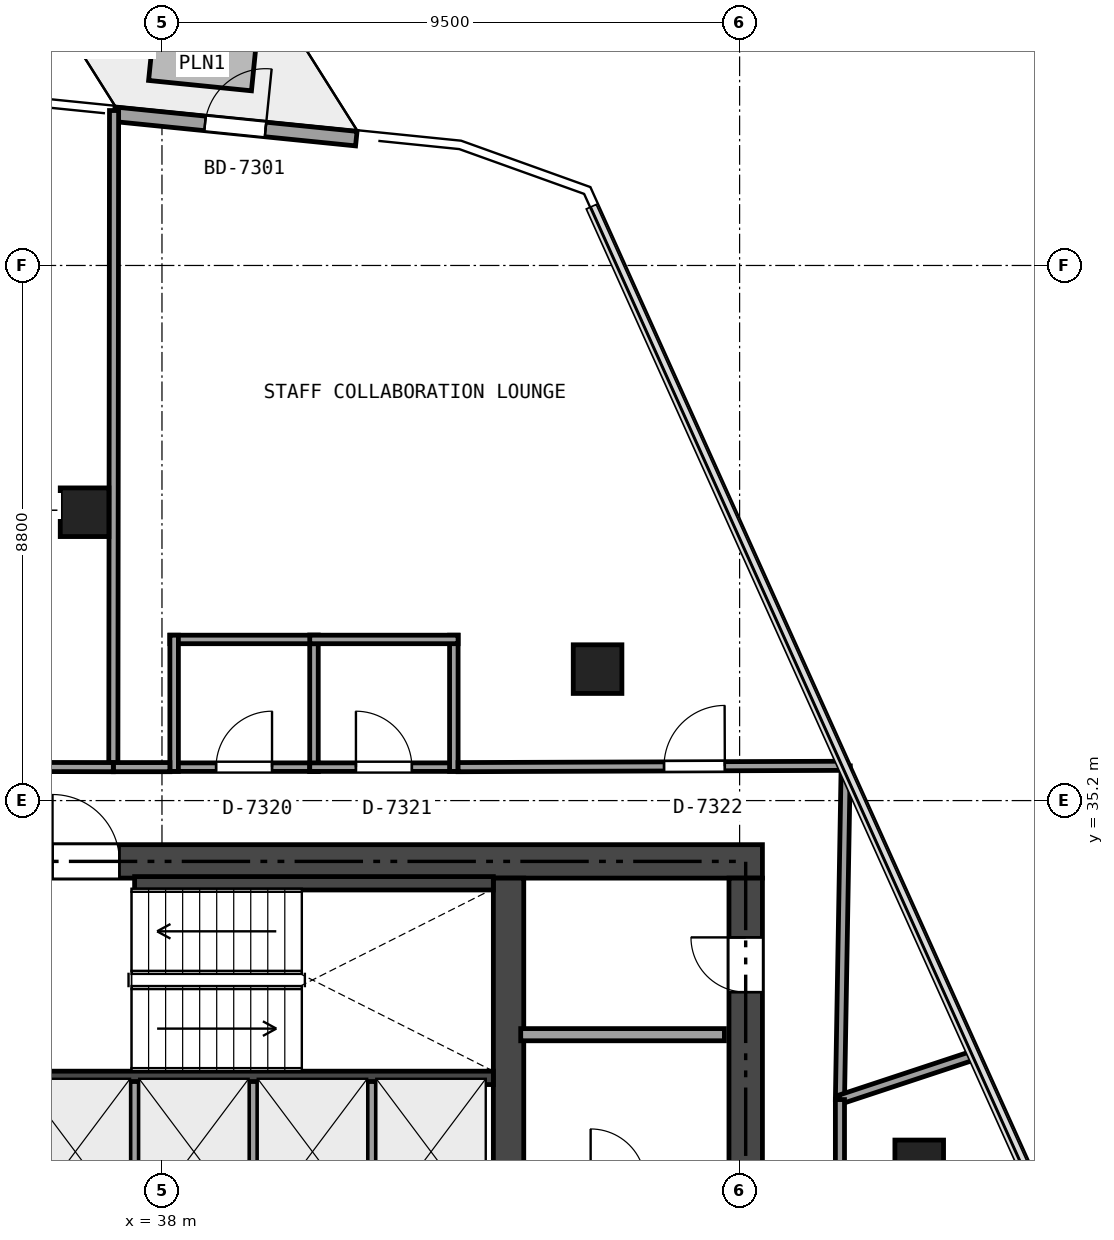
"""IFC4 building model, lengths in metres.
Left out: names, types, materials, properties, quantities, classifications, styles, units other than length and angle.
Written with IfcOpenShell. Run it as: python <this file> out.ifc"""

import sys

from ifc_helpers import new_model, si_unit, direction, frame, frame_2d, origin, origin_2d, place, context, subcontext, project, spatial, rectangle, extrude, element, fill, save


model = new_model("IFC4")
c1 = context("Model", 3, precision=1e-05, world=origin(), true_north=direction((0.0, 1.0)))
c2 = subcontext(c1, "Body", "Model", "MODEL_VIEW")
j1 = project(units=[si_unit("LENGTHUNIT", "METRE"), si_unit("PLANEANGLEUNIT", "RADIAN")], contexts=[c1])
p1 = place(None, origin())
s1 = spatial("IfcSite", under=j1, at=p1, CompositionType="ELEMENT")
p2 = place(p1, origin())
s2 = spatial("IfcBuilding", under=s1, at=p2, CompositionType="ELEMENT")
p3 = place(p2, frame((0.0, 0.0, 271.5)))
s3 = spatial("IfcBuildingStorey", under=s2, at=p3, CompositionType="ELEMENT", Elevation=271.5)
p4 = place(p3, frame((26.525, 34.2, 0.0), z_axis=(0.0, 0.0, 1.0), x_axis=(1.0, 0.0, 0.0)))
e1 = element("IfcWall", 1, at=p4, inside=s3, PredefinedType="SHEAR", context=c2, shape_type="SweptSolid", body=[
    extrude(rectangle(XDim=21.35, YDim=0.55, at=frame_2d((10.675, 0.0))), origin(), (0.0, 0.0, 1.0), 3.32),
])
p5 = place(p4, frame((9.675, 0.0, 0.0)))
e2 = element("IfcOpeningElement", 2, at=p5, cuts=e1, PredefinedType="OPENING", context=c2, shape_type="SweptSolid", body=[
    extrude(rectangle(XDim=1.1, YDim=2.15, at=frame_2d((0.55, 1.075))), frame((0.0, 0.285, 0.0), z_axis=(0.0, -1.0, 0.0), x_axis=(1.0, 0.0, 0.0)), (0.0, 0.0, 1.0), 0.57),
])
p6 = place(p4, frame((1.925, 0.0, 0.0)))
e3 = element("IfcOpeningElement", 3, at=p6, cuts=e1, PredefinedType="OPENING", context=c2, shape_type="SweptSolid", body=[
    extrude(rectangle(XDim=0.9, YDim=2.1, at=frame_2d((0.45, 1.05))), frame((0.0, 0.285, 0.0), z_axis=(0.0, -1.0, 0.0), x_axis=(1.0, 0.0, 0.0)), (0.0, 0.0, 1.0), 0.57),
])
p7 = place(p4, frame((6.225, 0.0, 0.0)))
e4 = element("IfcOpeningElement", 4, at=p7, cuts=e1, PredefinedType="OPENING", context=c2, shape_type="SweptSolid", body=[
    extrude(rectangle(XDim=0.9, YDim=2.1, at=frame_2d((0.45, 1.05))), frame((0.0, 0.285, 0.0), z_axis=(0.0, -1.0, 0.0), x_axis=(1.0, 0.0, 0.0)), (0.0, 0.0, 1.0), 0.57),
])
p8 = place(p3, frame((47.6, 18.875, 0.0), z_axis=(0.0, 0.0, 1.0), x_axis=(0.0, 1.0, 0.0)))
e5 = element("IfcWall", 5, at=p8, inside=s3, PredefinedType="SHEAR", context=c2, shape_type="SweptSolid", body=[
    extrude(rectangle(XDim=15.05, YDim=0.55, at=frame_2d((7.525, 0.0))), origin(), (0.0, 0.0, 1.0), 3.32),
])
p9 = place(p8, frame((6.625, 0.0, 0.0)))
e6 = element("IfcOpeningElement", 6, at=p9, cuts=e5, PredefinedType="OPENING", context=c2, shape_type="SweptSolid", body=[
    extrude(rectangle(XDim=1.1, YDim=2.15, at=frame_2d((0.55, 1.075))), frame((0.0, 0.285, 0.0), z_axis=(0.0, -1.0, 0.0), x_axis=(1.0, 0.0, 0.0)), (0.0, 0.0, 1.0), 0.57),
])
p10 = place(p8, frame((8.525, 0.0, 0.0)))
e7 = element("IfcOpeningElement", 7, at=p10, cuts=e5, PredefinedType="OPENING", context=c2, shape_type="SweptSolid", body=[
    extrude(rectangle(XDim=0.9, YDim=2.1, at=frame_2d((0.45, 1.05))), frame((0.0, 0.285, 0.0), z_axis=(0.0, -1.0, 0.0), x_axis=(1.0, 0.0, 0.0)), (0.0, 0.0, 1.0), 0.57),
])
p11 = place(p8, frame((13.175, 0.0, 0.0)))
e8 = element("IfcOpeningElement", 8, at=p11, cuts=e5, PredefinedType="OPENING", context=c2, shape_type="SweptSolid", body=[
    extrude(rectangle(XDim=0.9, YDim=2.1, at=frame_2d((0.45, 1.05))), frame((0.0, 0.285, 0.0), z_axis=(0.0, -1.0, 0.0), x_axis=(1.0, 0.0, 0.0)), (0.0, 0.0, 1.0), 0.57),
])
p12 = place(p3, frame((43.7, 18.875, 0.0), z_axis=(0.0, 0.0, 1.0), x_axis=(0.0, 1.0, 0.0)))
e9 = element("IfcWall", 9, at=p12, inside=s3, PredefinedType="SHEAR", context=c2, shape_type="SweptSolid", body=[
    extrude(rectangle(XDim=15.05, YDim=0.5, at=frame_2d((7.525, 0.0))), origin(), (0.0, 0.0, 1.0), 3.32),
])
p13 = place(p12, frame((8.125, 0.0, 0.0)))
e10 = element("IfcOpeningElement", 10, at=p13, cuts=e9, PredefinedType="OPENING", context=c2, shape_type="SweptSolid", body=[
    extrude(rectangle(XDim=0.9, YDim=2.1, at=frame_2d((0.45, 1.05))), frame((0.0, 0.26, 0.0), z_axis=(0.0, -1.0, 0.0), x_axis=(1.0, 0.0, 0.0)), (0.0, 0.0, 1.0), 0.52),
])
p14 = place(p3, frame((35.84, 30.64, 0.0), z_axis=(0.0, 0.0, 1.0), x_axis=(1.0, 0.0, 0.0)))
e11 = element("IfcWall", 11, at=p14, inside=s3, PredefinedType="SHEAR", context=c2, shape_type="SweptSolid", body=[
    extrude(rectangle(XDim=7.61, YDim=0.22, at=frame_2d((3.805, 0.0))), origin(), (0.0, 0.0, 1.0), 3.32),
])
p15 = place(p3, frame((37.55, 33.84, 0.0), z_axis=(0.0, 0.0, 1.0), x_axis=(1.0, 0.0, 0.0)))
e12 = element("IfcWall", 12, at=p15, inside=s3, PredefinedType="SHEAR", context=c2, shape_type="SweptSolid", body=[
    extrude(rectangle(XDim=5.9, YDim=0.22, at=frame_2d((2.95, 0.0))), origin(), (0.0, 0.0, 1.0), 3.32),
])
for number, where, z_axis, x_axis in (
    (13, (50.454, 29.217, 0.0), (0.0, 0.0, 1.0), (1.0, 0.0, 0.0)),
    (14, (45.164, 37.362, 0.0), (0.0, 0.0, 1.0), (1.0, 0.0, 0.0)),
    (15, (36.727, 39.942, 0.0), (0.0, 0.0, 1.0), (1.0, 0.0, 0.0)),
):
    element("IfcColumn", number, at=place(p3, frame(where, z_axis=z_axis, x_axis=x_axis)), inside=s3, PredefinedType="COLUMN", context=c2, shape_type="SweptSolid", body=[
        extrude(rectangle(XDim=0.8, YDim=0.8, at=origin_2d()), origin(), (0.0, 0.0, 1.0), 3.32),
    ])
p16 = place(p3, frame((37.216, 46.487, 0.0), z_axis=(0.0, 0.0, 1.0), x_axis=(0.994959540857, -0.100277176152, 0.0)))
e16 = element("IfcWall", 16, at=p16, inside=s3, PredefinedType="SOLIDWALL", context=c2, shape_type="SweptSolid", body=[
    extrude(rectangle(XDim=4.0, YDim=0.24, at=frame_2d((2.0, 0.0))), origin(), (0.0, 0.0, 1.0), 3.32),
])
p17 = place(p16, frame((1.5, 0.0, 0.0)))
e17 = element("IfcOpeningElement", 17, at=p17, cuts=e16, PredefinedType="OPENING", context=c2, shape_type="SweptSolid", body=[
    extrude(rectangle(XDim=1.0, YDim=2.15, at=frame_2d((0.5, 1.075))), frame((0.0, 0.13, 0.0), z_axis=(0.0, -1.0, 0.0), x_axis=(1.0, 0.0, 0.0)), (0.0, 0.0, 1.0), 0.26),
])
p18 = place(p3, frame((43.9, 31.35, 0.0), z_axis=(0.0, 0.0, 1.0), x_axis=(1.0, 0.0, 0.0)))
e18 = element("IfcWall", 18, at=p18, inside=s3, PredefinedType="SOLIDWALL", context=c2, shape_type="SweptSolid", body=[
    extrude(rectangle(XDim=3.35, YDim=0.2, at=frame_2d((1.675, 0.0))), origin(), (0.0, 0.0, 1.0), 2.993),
])
for number, where, z_axis, x_axis in (
    (19, (37.55, 28.15, 0.0), (0.0, 0.0, 1.0), (0.0, 1.0, 0.0)),
    (20, (39.5, 28.15, 0.0), (0.0, 0.0, 1.0), (0.0, 1.0, 0.0)),
    (21, (41.45, 28.15, 0.0), (0.0, 0.0, 1.0), (0.0, 1.0, 0.0)),
):
    element("IfcWall", number, at=place(p3, frame(where, z_axis=z_axis, x_axis=x_axis)), inside=s3, PredefinedType="PARTITIONING", context=c2, shape_type="SweptSolid", body=[
        extrude(rectangle(XDim=2.43, YDim=0.15, at=frame_2d((1.215, 0.0))), origin(), (0.0, 0.0, 1.0), 3.32),
    ])
p19 = place(p3, frame((38.13, 35.75, 0.0), z_axis=(0.0, 0.0, 1.0), x_axis=(1.0, 0.0, 0.0)))
e22 = element("IfcWall", 22, at=p19, inside=s3, PredefinedType="PARTITIONING", context=c2, shape_type="SweptSolid", body=[
    extrude(rectangle(XDim=2.44, YDim=0.14, at=frame_2d((1.22, 0.0))), origin(), (0.0, 0.0, 1.0), 2.841),
])
p20 = place(p19, frame((0.76, 0.0, 0.0)))
e23 = element("IfcOpeningElement", 23, at=p20, cuts=e22, PredefinedType="OPENING", context=c2, shape_type="SweptSolid", body=[
    extrude(rectangle(XDim=0.92, YDim=2.1, at=frame_2d((0.46, 1.05))), frame((0.0, 0.08, 0.0), z_axis=(0.0, -1.0, 0.0), x_axis=(1.0, 0.0, 0.0)), (0.0, 0.0, 1.0), 0.16),
])
p21 = place(p3, frame((40.5, 35.68, 0.0), z_axis=(0.0, 0.0, 1.0), x_axis=(0.0, 1.0, 0.0)))
e24 = element("IfcWall", 24, at=p21, inside=s3, PredefinedType="PARTITIONING", context=c2, shape_type="SweptSolid", body=[
    extrude(rectangle(XDim=2.24, YDim=0.14, at=frame_2d((1.12, 0.0))), origin(), (0.0, 0.0, 1.0), 2.993),
])
p22 = place(p3, frame((40.57, 37.85, 0.0), z_axis=(0.0, 0.0, 1.0), x_axis=(-1.0, 0.0, 0.0)))
e25 = element("IfcWall", 25, at=p22, inside=s3, PredefinedType="PARTITIONING", context=c2, shape_type="SweptSolid", body=[
    extrude(rectangle(XDim=2.44, YDim=0.14, at=frame_2d((1.22, 0.0))), origin(), (0.0, 0.0, 1.0), 2.841),
])
p23 = place(p3, frame((38.2, 37.92, 0.0), z_axis=(0.0, 0.0, 1.0), x_axis=(0.0, -1.0, 0.0)))
e26 = element("IfcWall", 26, at=p23, inside=s3, PredefinedType="PARTITIONING", context=c2, shape_type="SweptSolid", body=[
    extrude(rectangle(XDim=2.24, YDim=0.14, at=frame_2d((1.12, 0.0))), origin(), (0.0, 0.0, 1.0), 2.993),
])
p24 = place(p3, frame((40.43, 35.75, 0.0), z_axis=(0.0, 0.0, 1.0), x_axis=(1.0, 0.0, 0.0)))
e27 = element("IfcWall", 27, at=p24, inside=s3, PredefinedType="PARTITIONING", context=c2, shape_type="SweptSolid", body=[
    extrude(rectangle(XDim=2.44, YDim=0.14, at=frame_2d((1.22, 0.0))), origin(), (0.0, 0.0, 1.0), 2.841),
])
p25 = place(p24, frame((0.76, 0.0, 0.0)))
e28 = element("IfcOpeningElement", 28, at=p25, cuts=e27, PredefinedType="OPENING", context=c2, shape_type="SweptSolid", body=[
    extrude(rectangle(XDim=0.92, YDim=2.1, at=frame_2d((0.46, 1.05))), frame((0.0, 0.08, 0.0), z_axis=(0.0, -1.0, 0.0), x_axis=(1.0, 0.0, 0.0)), (0.0, 0.0, 1.0), 0.16),
])
p26 = place(p3, frame((42.8, 35.68, 0.0), z_axis=(0.0, 0.0, 1.0), x_axis=(0.0, 1.0, 0.0)))
e29 = element("IfcWall", 29, at=p26, inside=s3, PredefinedType="PARTITIONING", context=c2, shape_type="SweptSolid", body=[
    extrude(rectangle(XDim=2.24, YDim=0.14, at=frame_2d((1.12, 0.0))), origin(), (0.0, 0.0, 1.0), 2.993),
])
p27 = place(p3, frame((42.87, 37.85, 0.0), z_axis=(0.0, 0.0, 1.0), x_axis=(-1.0, 0.0, 0.0)))
e30 = element("IfcWall", 30, at=p27, inside=s3, PredefinedType="PARTITIONING", context=c2, shape_type="SweptSolid", body=[
    extrude(rectangle(XDim=2.44, YDim=0.14, at=frame_2d((1.22, 0.0))), origin(), (0.0, 0.0, 1.0), 2.841),
])
p28 = place(p3, frame((49.245, 35.772, 0.0), z_axis=(0.0, 0.0, 1.0), x_axis=(-0.017343830358, -0.999849584462, 0.0)))
e31 = element("IfcWall", 31, at=p28, inside=s3, PredefinedType="PARTITIONING", context=c2, shape_type="SweptSolid", body=[
    extrude(rectangle(XDim=5.49, YDim=0.15, at=frame_2d((2.745, 0.0))), origin(), (0.0, 0.0, 1.0), 2.845),
])
p29 = place(p3, frame((49.15, 30.283, 0.0), z_axis=(0.0, 0.0, 1.0), x_axis=(0.949448945232, 0.313921487634, 0.0)))
e32 = element("IfcWall", 32, at=p29, inside=s3, PredefinedType="PARTITIONING", context=c2, shape_type="SweptSolid", body=[
    extrude(rectangle(XDim=2.351, YDim=0.15, at=frame_2d((1.176, 0.0))), origin(), (0.0, 0.0, 1.0), 2.845),
])
p30 = place(p3, frame((37.212, 46.548, 0.0), z_axis=(0.0, 0.0, 1.0), x_axis=(-0.001107869722, -0.999999386312, 0.0)))
e33 = element("IfcWall", 33, at=p30, inside=s3, PredefinedType="PARTITIONING", context=c2, shape_type="SweptSolid", body=[
    extrude(rectangle(XDim=10.798, YDim=0.15, at=frame_2d((5.399, 0.0))), origin(), (0.0, 0.0, 1.0), 2.845),
])
p31 = place(p3, frame((37.2, 35.75, 0.0), z_axis=(0.0, 0.0, 1.0), x_axis=(1.0, 0.0, 0.0)))
e34 = element("IfcWall", 34, at=p31, inside=s3, PredefinedType="PARTITIONING", context=c2, shape_type="SweptSolid", body=[
    extrude(rectangle(XDim=0.93, YDim=0.15, at=frame_2d((0.465, 0.0))), origin(), (0.0, 0.0, 1.0), 3.32),
])
p32 = place(p3, frame((42.87, 35.75, 0.0), z_axis=(0.0, 0.0, 1.0), x_axis=(0.999994060213, 0.003446670704, 0.0)))
e35 = element("IfcWall", 35, at=p32, inside=s3, PredefinedType="PARTITIONING", context=c2, shape_type="SweptSolid", body=[
    extrude(rectangle(XDim=6.375, YDim=0.15, at=frame_2d((3.188, 0.0))), origin(), (0.0, 0.0, 1.0), 2.769),
])
p33 = place(p32, frame((3.387, 0.0, 0.0)))
e36 = element("IfcOpeningElement", 36, at=p33, cuts=e35, PredefinedType="OPENING", context=c2, shape_type="SweptSolid", body=[
    extrude(rectangle(XDim=1.0, YDim=2.15, at=frame_2d((0.5, 1.075))), frame((0.0, 0.085, 0.0), z_axis=(0.0, -1.0, 0.0), x_axis=(1.0, 0.0, 0.0)), (0.0, 0.0, 1.0), 0.17),
])
p34 = place(p3, frame((25.674, 35.77, 0.0), z_axis=(0.0, 0.0, 1.0), x_axis=(0.999998491558, -0.001736917524, 0.0)))
e37 = element("IfcWall", 37, at=p34, inside=s3, PredefinedType="PARTITIONING", context=c2, shape_type="SweptSolid", body=[
    extrude(rectangle(XDim=11.526, YDim=0.15, at=frame_2d((5.763, 0.0))), origin(), (0.0, 0.0, 1.0), 2.769),
])
p35 = place(p34, frame((5.263, 0.0, 0.0)))
e38 = element("IfcOpeningElement", 38, at=p35, cuts=e37, PredefinedType="OPENING", context=c2, shape_type="SweptSolid", body=[
    extrude(rectangle(XDim=1.0, YDim=2.15, at=frame_2d((0.5, 1.075))), frame((0.0, 0.085, 0.0), z_axis=(0.0, -1.0, 0.0), x_axis=(1.0, 0.0, 0.0)), (0.0, 0.0, 1.0), 0.17),
])
p36 = place(p3, frame((49.15, 30.283, 0.0), z_axis=(0.0, 0.0, 1.0), x_axis=(0.0, -1.0, 0.0)))
e39 = element("IfcWall", 39, at=p36, inside=s3, PredefinedType="PARTITIONING", context=c2, shape_type="SweptSolid", body=[
    extrude(rectangle(XDim=13.233, YDim=0.15, at=frame_2d((6.616, 0.0))), origin(), (0.0, 0.0, 1.0), 2.769),
])
p37 = place(p36, frame((5.277, 0.0, 0.0)))
e40 = element("IfcOpeningElement", 40, at=p37, cuts=e39, PredefinedType="OPENING", context=c2, shape_type="SweptSolid", body=[
    extrude(rectangle(XDim=1.0, YDim=2.15, at=frame_2d((0.5, 1.075))), frame((0.0, 0.085, 0.0), z_axis=(0.0, -1.0, 0.0), x_axis=(1.0, 0.0, 0.0)), (0.0, 0.0, 1.0), 0.17),
])
p38 = place(p17, origin())
e41 = element("IfcDoor", 41, at=p38, inside=s3, OperationType="SINGLE_SWING_RIGHT", PredefinedType="DOOR", context=c2, shape_type="SweptSolid", body=[
    extrude(rectangle(XDim=1.0, YDim=2.15, at=frame_2d((0.5, 1.075))), frame((0.0, 0.025, 0.0), z_axis=(0.0, -1.0, 0.0), x_axis=(1.0, 0.0, 0.0)), (0.0, 0.0, 1.0), 0.05),
])
fill(e17, e41)
p39 = place(p5, origin())
e42 = element("IfcDoor", 42, at=p39, inside=s3, OperationType="SINGLE_SWING_LEFT", PredefinedType="DOOR", context=c2, shape_type="SweptSolid", body=[
    extrude(rectangle(XDim=1.1, YDim=2.15, at=frame_2d((0.55, 1.075))), frame((0.0, 0.025, 0.0), z_axis=(0.0, -1.0, 0.0), x_axis=(1.0, 0.0, 0.0)), (0.0, 0.0, 1.0), 0.05),
])
fill(e2, e42)
p40 = place(p11, origin())
e43 = element("IfcDoor", 43, at=p40, inside=s3, OperationType="SINGLE_SWING_RIGHT", PredefinedType="DOOR", context=c2, shape_type="SweptSolid", body=[
    extrude(rectangle(XDim=0.9, YDim=2.1, at=frame_2d((0.45, 1.05))), frame((0.0, 0.025, 0.0), z_axis=(0.0, -1.0, 0.0), x_axis=(1.0, 0.0, 0.0)), (0.0, 0.0, 1.0), 0.05),
])
fill(e8, e43)
p41 = place(p20, origin())
e44 = element("IfcDoor", 44, at=p41, inside=s3, OperationType="SINGLE_SWING_RIGHT", PredefinedType="DOOR", context=c2, shape_type="SweptSolid", body=[
    extrude(rectangle(XDim=0.92, YDim=2.1, at=frame_2d((0.46, 1.05))), frame((0.0, 0.025, 0.0), z_axis=(0.0, -1.0, 0.0), x_axis=(1.0, 0.0, 0.0)), (0.0, 0.0, 1.0), 0.05),
])
fill(e23, e44)
p42 = place(p25, origin())
e45 = element("IfcDoor", 45, at=p42, inside=s3, OperationType="SINGLE_SWING_LEFT", PredefinedType="DOOR", context=c2, shape_type="SweptSolid", body=[
    extrude(rectangle(XDim=0.92, YDim=2.1, at=frame_2d((0.46, 1.05))), frame((0.0, 0.025, 0.0), z_axis=(0.0, -1.0, 0.0), x_axis=(1.0, 0.0, 0.0)), (0.0, 0.0, 1.0), 0.05),
])
fill(e28, e45)
p43 = place(p33, origin())
e46 = element("IfcDoor", 46, at=p43, inside=s3, OperationType="SINGLE_SWING_RIGHT", PredefinedType="DOOR", context=c2, shape_type="SweptSolid", body=[
    extrude(rectangle(XDim=1.0, YDim=2.15, at=frame_2d((0.5, 1.075))), frame((0.0, 0.025, 0.0), z_axis=(0.0, -1.0, 0.0), x_axis=(1.0, 0.0, 0.0)), (0.0, 0.0, 1.0), 0.05),
])
fill(e36, e46)
save(model, sys.argv[1])
